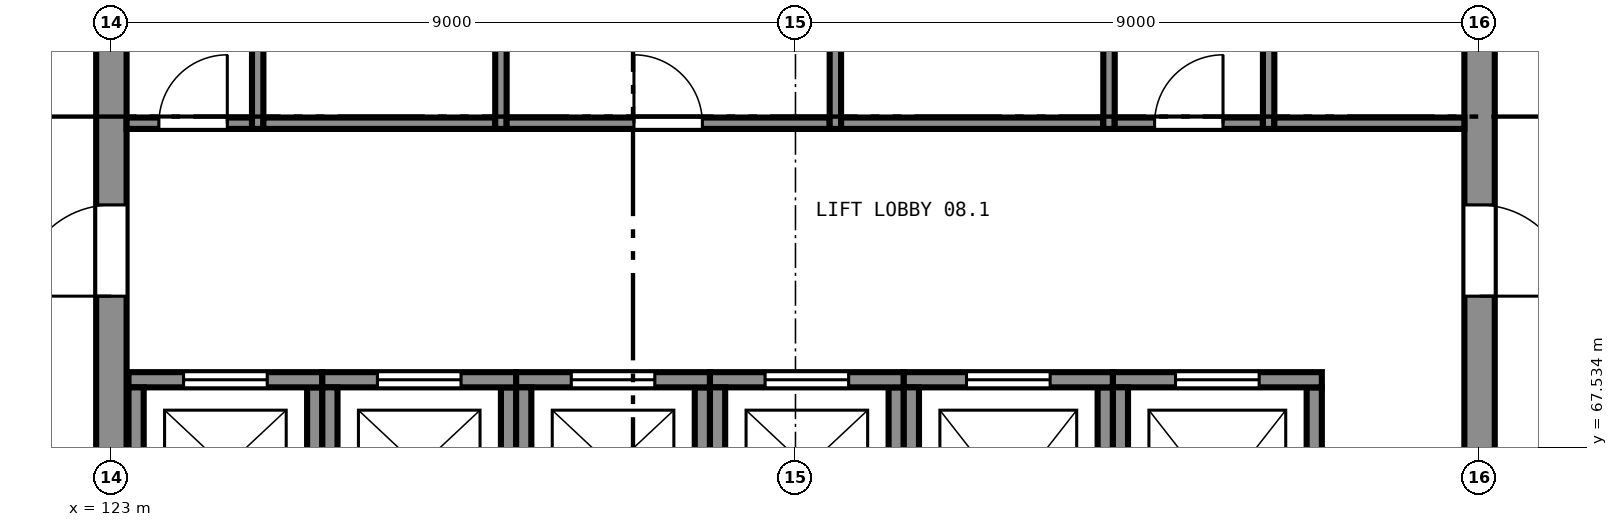
"""IFC4 building model, lengths in metres.
Left out: names, types, materials, properties, quantities, classifications, styles, units other than length and angle.
Written with IfcOpenShell. Run it as: python <this file> out.ifc"""

import sys

from ifc_helpers import new_model, si_unit, direction, frame, frame_2d, origin, place, context, subcontext, project, spatial, rectangle, extrude, element, fill, save


model = new_model("IFC4")
c1 = context("Model", 3, precision=1e-05, world=origin(), true_north=direction((0.0, 1.0)))
c2 = subcontext(c1, "Body", "Model", "MODEL_VIEW")
j1 = project(units=[si_unit("LENGTHUNIT", "METRE"), si_unit("PLANEANGLEUNIT", "RADIAN")], contexts=[c1])
p1 = place(None, origin())
s1 = spatial("IfcSite", under=j1, at=p1, CompositionType="ELEMENT")
p2 = place(p1, origin())
s2 = spatial("IfcBuilding", under=s1, at=p2, CompositionType="ELEMENT")
p3 = place(p2, frame((0.0, 0.0, 33.5)))
s3 = spatial("IfcBuildingStorey", under=s2, at=p3, CompositionType="ELEMENT", Elevation=33.5)
p4 = place(p3, frame((141.0, 65.2, 0.0), z_axis=(0.0, 0.0, 1.0), x_axis=(0.0, 1.0, 0.0)))
e1 = element("IfcWall", 1, at=p4, inside=s3, PredefinedType="SHEAR", context=c2, shape_type="SweptSolid", body=[
    extrude(rectangle(XDim=17.6, YDim=0.4, at=frame_2d((8.8, 0.0))), origin(), (0.0, 0.0, 1.0), 4.0),
])
p5 = place(p4, frame((4.325, 0.0, 0.0)))
e2 = element("IfcOpeningElement", 2, at=p5, cuts=e1, PredefinedType="OPENING", context=c2, shape_type="SweptSolid", body=[
    extrude(rectangle(XDim=1.2, YDim=2.1, at=frame_2d((0.6, 1.05))), frame((0.0, 0.21, 0.0), z_axis=(0.0, -1.0, 0.0), x_axis=(1.0, 0.0, 0.0)), (0.0, 0.0, 1.0), 0.42),
])
p6 = place(p4, frame((12.075, 0.0, 0.0)))
e3 = element("IfcOpeningElement", 3, at=p6, cuts=e1, PredefinedType="OPENING", context=c2, shape_type="SweptSolid", body=[
    extrude(rectangle(XDim=1.2, YDim=2.1, at=frame_2d((0.6, 1.05))), frame((0.0, 0.21, 0.0), z_axis=(0.0, -1.0, 0.0), x_axis=(1.0, 0.0, 0.0)), (0.0, 0.0, 1.0), 0.42),
])
p7 = place(p3, frame((123.0, 82.8, 0.0), z_axis=(0.0, 0.0, 1.0), x_axis=(0.0, -1.0, 0.0)))
e4 = element("IfcWall", 4, at=p7, inside=s3, PredefinedType="SHEAR", context=c2, shape_type="SweptSolid", body=[
    extrude(rectangle(XDim=17.6, YDim=0.4, at=frame_2d((8.8, 0.0))), origin(), (0.0, 0.0, 1.0), 4.0),
])
p8 = place(p7, frame((12.075, 0.0, 0.0)))
e5 = element("IfcOpeningElement", 5, at=p8, cuts=e4, PredefinedType="OPENING", context=c2, shape_type="SweptSolid", body=[
    extrude(rectangle(XDim=1.2, YDim=2.1, at=frame_2d((0.6, 1.05))), frame((0.0, 0.21, 0.0), z_axis=(0.0, -1.0, 0.0), x_axis=(1.0, 0.0, 0.0)), (0.0, 0.0, 1.0), 0.42),
])
p9 = place(p7, frame((4.325, 0.0, 0.0)))
e6 = element("IfcOpeningElement", 6, at=p9, cuts=e4, PredefinedType="OPENING", context=c2, shape_type="SweptSolid", body=[
    extrude(rectangle(XDim=1.2, YDim=2.1, at=frame_2d((0.6, 1.05))), frame((0.0, 0.21, 0.0), z_axis=(0.0, -1.0, 0.0), x_axis=(1.0, 0.0, 0.0)), (0.0, 0.0, 1.0), 0.42),
])
p10 = place(p3, frame((125.675, 66.225, 0.0), z_axis=(0.0, 0.0, 1.0), x_axis=(0.0, 1.0, 0.0)))
e7 = element("IfcWall", 7, at=p10, inside=s3, PredefinedType="SHEAR", context=c2, shape_type="SweptSolid", body=[
    extrude(rectangle(XDim=2.1, YDim=0.2, at=frame_2d((1.05, 0.0))), origin(), (0.0, 0.0, 1.0), 4.0),
])
p11 = place(p3, frame((125.775, 68.425, 0.0), z_axis=(0.0, 0.0, 1.0), x_axis=(-1.0, 0.0, 0.0)))
e8 = element("IfcWall", 8, at=p11, inside=s3, PredefinedType="SHEAR", context=c2, shape_type="SweptSolid", body=[
    extrude(rectangle(XDim=2.55, YDim=0.2, at=frame_2d((1.275, 0.0))), origin(), (0.0, 0.0, 1.0), 4.0),
])
p12 = place(p11, frame((0.725, 0.0, 0.0)))
e9 = element("IfcOpeningElement", 9, at=p12, cuts=e8, PredefinedType="OPENING", context=c2, shape_type="SweptSolid", body=[
    extrude(rectangle(XDim=1.1, YDim=2.1, at=frame_2d((0.55, 1.05))), frame((0.0, 0.11, 0.0), z_axis=(0.0, -1.0, 0.0), x_axis=(1.0, 0.0, 0.0)), (0.0, 0.0, 1.0), 0.22),
])
for number, where, z_axis, x_axis in (
    (10, (123.325, 68.325, 0.0), (0.0, 0.0, 1.0), (0.0, -1.0, 0.0)),
    (11, (128.225, 66.225, 0.0), (0.0, 0.0, 1.0), (0.0, 1.0, 0.0)),
):
    element("IfcWall", number, at=place(p3, frame(where, z_axis=z_axis, x_axis=x_axis)), inside=s3, PredefinedType="SHEAR", context=c2, shape_type="SweptSolid", body=[
        extrude(rectangle(XDim=2.1, YDim=0.2, at=frame_2d((1.05, 0.0))), origin(), (0.0, 0.0, 1.0), 4.0),
    ])
p13 = place(p3, frame((128.325, 68.425, 0.0), z_axis=(0.0, 0.0, 1.0), x_axis=(-1.0, 0.0, 0.0)))
e12 = element("IfcWall", 12, at=p13, inside=s3, PredefinedType="SHEAR", context=c2, shape_type="SweptSolid", body=[
    extrude(rectangle(XDim=2.55, YDim=0.2, at=frame_2d((1.275, 0.0))), origin(), (0.0, 0.0, 1.0), 4.0),
])
p14 = place(p13, frame((0.725, 0.0, 0.0)))
e13 = element("IfcOpeningElement", 13, at=p14, cuts=e12, PredefinedType="OPENING", context=c2, shape_type="SweptSolid", body=[
    extrude(rectangle(XDim=1.1, YDim=2.1, at=frame_2d((0.55, 1.05))), frame((0.0, 0.11, 0.0), z_axis=(0.0, -1.0, 0.0), x_axis=(1.0, 0.0, 0.0)), (0.0, 0.0, 1.0), 0.22),
])
for number, where, z_axis, x_axis in (
    (14, (125.875, 68.325, 0.0), (0.0, 0.0, 1.0), (0.0, -1.0, 0.0)),
    (15, (130.775, 66.225, 0.0), (0.0, 0.0, 1.0), (0.0, 1.0, 0.0)),
):
    element("IfcWall", number, at=place(p3, frame(where, z_axis=z_axis, x_axis=x_axis)), inside=s3, PredefinedType="SHEAR", context=c2, shape_type="SweptSolid", body=[
        extrude(rectangle(XDim=2.1, YDim=0.2, at=frame_2d((1.05, 0.0))), origin(), (0.0, 0.0, 1.0), 4.0),
    ])
p15 = place(p3, frame((130.875, 68.425, 0.0), z_axis=(0.0, 0.0, 1.0), x_axis=(-1.0, 0.0, 0.0)))
e16 = element("IfcWall", 16, at=p15, inside=s3, PredefinedType="SHEAR", context=c2, shape_type="SweptSolid", body=[
    extrude(rectangle(XDim=2.55, YDim=0.2, at=frame_2d((1.275, 0.0))), origin(), (0.0, 0.0, 1.0), 4.0),
])
p16 = place(p15, frame((0.725, 0.0, 0.0)))
e17 = element("IfcOpeningElement", 17, at=p16, cuts=e16, PredefinedType="OPENING", context=c2, shape_type="SweptSolid", body=[
    extrude(rectangle(XDim=1.1, YDim=2.1, at=frame_2d((0.55, 1.05))), frame((0.0, 0.11, 0.0), z_axis=(0.0, -1.0, 0.0), x_axis=(1.0, 0.0, 0.0)), (0.0, 0.0, 1.0), 0.22),
])
for number, where, z_axis, x_axis in (
    (18, (128.425, 68.325, 0.0), (0.0, 0.0, 1.0), (0.0, -1.0, 0.0)),
    (19, (133.325, 66.225, 0.0), (0.0, 0.0, 1.0), (0.0, 1.0, 0.0)),
):
    element("IfcWall", number, at=place(p3, frame(where, z_axis=z_axis, x_axis=x_axis)), inside=s3, PredefinedType="SHEAR", context=c2, shape_type="SweptSolid", body=[
        extrude(rectangle(XDim=2.1, YDim=0.2, at=frame_2d((1.05, 0.0))), origin(), (0.0, 0.0, 1.0), 4.0),
    ])
p17 = place(p3, frame((133.425, 68.425, 0.0), z_axis=(0.0, 0.0, 1.0), x_axis=(-1.0, 0.0, 0.0)))
e20 = element("IfcWall", 20, at=p17, inside=s3, PredefinedType="SHEAR", context=c2, shape_type="SweptSolid", body=[
    extrude(rectangle(XDim=2.55, YDim=0.2, at=frame_2d((1.275, 0.0))), origin(), (0.0, 0.0, 1.0), 4.0),
])
p18 = place(p17, frame((0.725, 0.0, 0.0)))
e21 = element("IfcOpeningElement", 21, at=p18, cuts=e20, PredefinedType="OPENING", context=c2, shape_type="SweptSolid", body=[
    extrude(rectangle(XDim=1.1, YDim=2.1, at=frame_2d((0.55, 1.05))), frame((0.0, 0.11, 0.0), z_axis=(0.0, -1.0, 0.0), x_axis=(1.0, 0.0, 0.0)), (0.0, 0.0, 1.0), 0.22),
])
p19 = place(p3, frame((130.975, 68.325, 0.0), z_axis=(0.0, 0.0, 1.0), x_axis=(0.0, -1.0, 0.0)))
e22 = element("IfcWall", 22, at=p19, inside=s3, PredefinedType="SHEAR", context=c2, shape_type="SweptSolid", body=[
    extrude(rectangle(XDim=2.1, YDim=0.2, at=frame_2d((1.05, 0.0))), origin(), (0.0, 0.0, 1.0), 4.0),
])
p20 = place(p3, frame((136.075, 65.425, 0.0), z_axis=(0.0, 0.0, 1.0), x_axis=(0.0, 1.0, 0.0)))
e23 = element("IfcWall", 23, at=p20, inside=s3, PredefinedType="SHEAR", context=c2, shape_type="SweptSolid", body=[
    extrude(rectangle(XDim=2.9, YDim=0.2, at=frame_2d((1.45, 0.0))), origin(), (0.0, 0.0, 1.0), 4.0),
])
p21 = place(p3, frame((136.175, 68.425, 0.0), z_axis=(0.0, 0.0, 1.0), x_axis=(-1.0, 0.0, 0.0)))
e24 = element("IfcWall", 24, at=p21, inside=s3, PredefinedType="SHEAR", context=c2, shape_type="SweptSolid", body=[
    extrude(rectangle(XDim=2.75, YDim=0.2, at=frame_2d((1.375, 0.0))), origin(), (0.0, 0.0, 1.0), 4.0),
])
p22 = place(p21, frame((0.825, 0.0, 0.0)))
e25 = element("IfcOpeningElement", 25, at=p22, cuts=e24, PredefinedType="OPENING", context=c2, shape_type="SweptSolid", body=[
    extrude(rectangle(XDim=1.1, YDim=2.1, at=frame_2d((0.55, 1.05))), frame((0.0, 0.11, 0.0), z_axis=(0.0, -1.0, 0.0), x_axis=(1.0, 0.0, 0.0)), (0.0, 0.0, 1.0), 0.22),
])
for number, where, z_axis, x_axis in (
    (26, (133.525, 68.325, 0.0), (0.0, 0.0, 1.0), (0.0, -1.0, 0.0)),
    (27, (138.825, 65.425, 0.0), (0.0, 0.0, 1.0), (0.0, 1.0, 0.0)),
):
    element("IfcWall", number, at=place(p3, frame(where, z_axis=z_axis, x_axis=x_axis)), inside=s3, PredefinedType="SHEAR", context=c2, shape_type="SweptSolid", body=[
        extrude(rectangle(XDim=2.9, YDim=0.2, at=frame_2d((1.45, 0.0))), origin(), (0.0, 0.0, 1.0), 4.0),
    ])
p23 = place(p3, frame((138.925, 68.425, 0.0), z_axis=(0.0, 0.0, 1.0), x_axis=(-1.0, 0.0, 0.0)))
e28 = element("IfcWall", 28, at=p23, inside=s3, PredefinedType="SHEAR", context=c2, shape_type="SweptSolid", body=[
    extrude(rectangle(XDim=2.75, YDim=0.2, at=frame_2d((1.375, 0.0))), origin(), (0.0, 0.0, 1.0), 4.0),
])
p24 = place(p23, frame((0.825, 0.0, 0.0)))
e29 = element("IfcOpeningElement", 29, at=p24, cuts=e28, PredefinedType="OPENING", context=c2, shape_type="SweptSolid", body=[
    extrude(rectangle(XDim=1.1, YDim=2.1, at=frame_2d((0.55, 1.05))), frame((0.0, 0.11, 0.0), z_axis=(0.0, -1.0, 0.0), x_axis=(1.0, 0.0, 0.0)), (0.0, 0.0, 1.0), 0.22),
])
p25 = place(p3, frame((136.275, 68.325, 0.0), z_axis=(0.0, 0.0, 1.0), x_axis=(0.0, -1.0, 0.0)))
e30 = element("IfcWall", 30, at=p25, inside=s3, PredefinedType="SHEAR", context=c2, shape_type="SweptSolid", body=[
    extrude(rectangle(XDim=2.9, YDim=0.2, at=frame_2d((1.45, 0.0))), origin(), (0.0, 0.0, 1.0), 4.0),
])
p26 = place(p3, frame((124.925, 71.725, 0.0), z_axis=(0.0, 0.0, 1.0), x_axis=(0.0, 1.0, 0.0)))
e31 = element("IfcWall", 31, at=p26, inside=s3, PredefinedType="PARTITIONING", context=c2, shape_type="SweptSolid", body=[
    extrude(rectangle(XDim=4.55, YDim=0.15, at=frame_2d((2.275, 0.0))), origin(), (0.0, 0.0, 1.0), 3.75),
])
p27 = place(p3, frame((123.2, 71.8, 0.0), z_axis=(0.0, 0.0, 1.0), x_axis=(1.0, 0.0, 0.0)))
e32 = element("IfcWall", 32, at=p27, inside=s3, PredefinedType="PARTITIONING", context=c2, shape_type="SweptSolid", body=[
    extrude(rectangle(XDim=1.65, YDim=0.15, at=frame_2d((0.825, 0.0))), origin(), (0.0, 0.0, 1.0), 3.75),
])
p28 = place(p27, frame((0.425, 0.0, 0.0)))
e33 = element("IfcOpeningElement", 33, at=p28, cuts=e32, PredefinedType="OPENING", context=c2, shape_type="SweptSolid", body=[
    extrude(rectangle(XDim=0.9, YDim=2.1, at=frame_2d((0.45, 1.05))), frame((0.0, 0.085, 0.0), z_axis=(0.0, -1.0, 0.0), x_axis=(1.0, 0.0, 0.0)), (0.0, 0.0, 1.0), 0.17),
])
p29 = place(p3, frame((128.125, 71.725, 0.0), z_axis=(0.0, 0.0, 1.0), x_axis=(0.0, 1.0, 0.0)))
e34 = element("IfcWall", 34, at=p29, inside=s3, PredefinedType="PARTITIONING", context=c2, shape_type="SweptSolid", body=[
    extrude(rectangle(XDim=4.55, YDim=0.15, at=frame_2d((2.275, 0.0))), origin(), (0.0, 0.0, 1.0), 3.75),
])
p30 = place(p3, frame((125.0, 71.8, 0.0), z_axis=(0.0, 0.0, 1.0), x_axis=(1.0, 0.0, 0.0)))
e35 = element("IfcWall", 35, at=p30, inside=s3, PredefinedType="PARTITIONING", context=c2, shape_type="SweptSolid", body=[
    extrude(rectangle(XDim=3.05, YDim=0.15, at=frame_2d((1.525, 0.0))), origin(), (0.0, 0.0, 1.0), 3.75),
])
p31 = place(p3, frame((132.525, 71.725, 0.0), z_axis=(0.0, 0.0, 1.0), x_axis=(0.0, 1.0, 0.0)))
e36 = element("IfcWall", 36, at=p31, inside=s3, PredefinedType="PARTITIONING", context=c2, shape_type="SweptSolid", body=[
    extrude(rectangle(XDim=4.55, YDim=0.15, at=frame_2d((2.275, 0.0))), origin(), (0.0, 0.0, 1.0), 3.75),
])
p32 = place(p3, frame((128.2, 71.8, 0.0), z_axis=(0.0, 0.0, 1.0), x_axis=(1.0, 0.0, 0.0)))
e37 = element("IfcWall", 37, at=p32, inside=s3, PredefinedType="PARTITIONING", context=c2, shape_type="SweptSolid", body=[
    extrude(rectangle(XDim=4.25, YDim=0.15, at=frame_2d((2.125, 0.0))), origin(), (0.0, 0.0, 1.0), 3.75),
])
p33 = place(p32, frame((1.675, 0.0, 0.0)))
e38 = element("IfcOpeningElement", 38, at=p33, cuts=e37, PredefinedType="OPENING", context=c2, shape_type="SweptSolid", body=[
    extrude(rectangle(XDim=0.9, YDim=2.1, at=frame_2d((0.45, 1.05))), frame((0.0, 0.085, 0.0), z_axis=(0.0, -1.0, 0.0), x_axis=(1.0, 0.0, 0.0)), (0.0, 0.0, 1.0), 0.17),
])
p34 = place(p3, frame((136.125, 71.725, 0.0), z_axis=(0.0, 0.0, 1.0), x_axis=(0.0, 1.0, 0.0)))
e39 = element("IfcWall", 39, at=p34, inside=s3, PredefinedType="PARTITIONING", context=c2, shape_type="SweptSolid", body=[
    extrude(rectangle(XDim=4.55, YDim=0.15, at=frame_2d((2.275, 0.0))), origin(), (0.0, 0.0, 1.0), 3.75),
])
p35 = place(p3, frame((132.6, 71.8, 0.0), z_axis=(0.0, 0.0, 1.0), x_axis=(1.0, 0.0, 0.0)))
e40 = element("IfcWall", 40, at=p35, inside=s3, PredefinedType="PARTITIONING", context=c2, shape_type="SweptSolid", body=[
    extrude(rectangle(XDim=3.45, YDim=0.15, at=frame_2d((1.725, 0.0))), origin(), (0.0, 0.0, 1.0), 3.75),
])
p36 = place(p3, frame((138.225, 71.725, 0.0), z_axis=(0.0, 0.0, 1.0), x_axis=(0.0, 1.0, 0.0)))
e41 = element("IfcWall", 41, at=p36, inside=s3, PredefinedType="PARTITIONING", context=c2, shape_type="SweptSolid", body=[
    extrude(rectangle(XDim=4.55, YDim=0.15, at=frame_2d((2.275, 0.0))), origin(), (0.0, 0.0, 1.0), 3.75),
])
p37 = place(p3, frame((136.2, 71.8, 0.0), z_axis=(0.0, 0.0, 1.0), x_axis=(1.0, 0.0, 0.0)))
e42 = element("IfcWall", 42, at=p37, inside=s3, PredefinedType="PARTITIONING", context=c2, shape_type="SweptSolid", body=[
    extrude(rectangle(XDim=1.95, YDim=0.15, at=frame_2d((0.975, 0.0))), origin(), (0.0, 0.0, 1.0), 3.75),
])
p38 = place(p37, frame((0.525, 0.0, 0.0)))
e43 = element("IfcOpeningElement", 43, at=p38, cuts=e42, PredefinedType="OPENING", context=c2, shape_type="SweptSolid", body=[
    extrude(rectangle(XDim=0.9, YDim=2.1, at=frame_2d((0.45, 1.05))), frame((0.0, 0.085, 0.0), z_axis=(0.0, -1.0, 0.0), x_axis=(1.0, 0.0, 0.0)), (0.0, 0.0, 1.0), 0.17),
])
p39 = place(p3, frame((138.3, 71.8, 0.0), z_axis=(0.0, 0.0, 1.0), x_axis=(1.0, 0.0, 0.0)))
e44 = element("IfcWall", 44, at=p39, inside=s3, PredefinedType="PARTITIONING", context=c2, shape_type="SweptSolid", body=[
    extrude(rectangle(XDim=2.5, YDim=0.15, at=frame_2d((1.25, 0.0))), origin(), (0.0, 0.0, 1.0), 3.75),
])
p40 = place(p12, origin())
e45 = element("IfcDoor", 45, at=p40, inside=s3, OperationType="SLIDING_TO_LEFT", PredefinedType="DOOR", context=c2, shape_type="SweptSolid", body=[
    extrude(rectangle(XDim=1.1, YDim=2.1, at=frame_2d((0.55, 1.05))), frame((0.0, 0.025, 0.0), z_axis=(0.0, -1.0, 0.0), x_axis=(1.0, 0.0, 0.0)), (0.0, 0.0, 1.0), 0.05),
])
fill(e9, e45)
p41 = place(p14, origin())
e46 = element("IfcDoor", 46, at=p41, inside=s3, OperationType="SLIDING_TO_LEFT", PredefinedType="DOOR", context=c2, shape_type="SweptSolid", body=[
    extrude(rectangle(XDim=1.1, YDim=2.1, at=frame_2d((0.55, 1.05))), frame((0.0, 0.025, 0.0), z_axis=(0.0, -1.0, 0.0), x_axis=(1.0, 0.0, 0.0)), (0.0, 0.0, 1.0), 0.05),
])
fill(e13, e46)
p42 = place(p16, origin())
e47 = element("IfcDoor", 47, at=p42, inside=s3, OperationType="SLIDING_TO_LEFT", PredefinedType="DOOR", context=c2, shape_type="SweptSolid", body=[
    extrude(rectangle(XDim=1.1, YDim=2.1, at=frame_2d((0.55, 1.05))), frame((0.0, 0.025, 0.0), z_axis=(0.0, -1.0, 0.0), x_axis=(1.0, 0.0, 0.0)), (0.0, 0.0, 1.0), 0.05),
])
fill(e17, e47)
p43 = place(p18, origin())
e48 = element("IfcDoor", 48, at=p43, inside=s3, OperationType="SLIDING_TO_LEFT", PredefinedType="DOOR", context=c2, shape_type="SweptSolid", body=[
    extrude(rectangle(XDim=1.1, YDim=2.1, at=frame_2d((0.55, 1.05))), frame((0.0, 0.025, 0.0), z_axis=(0.0, -1.0, 0.0), x_axis=(1.0, 0.0, 0.0)), (0.0, 0.0, 1.0), 0.05),
])
fill(e21, e48)
p44 = place(p22, origin())
e49 = element("IfcDoor", 49, at=p44, inside=s3, OperationType="SLIDING_TO_LEFT", PredefinedType="DOOR", context=c2, shape_type="SweptSolid", body=[
    extrude(rectangle(XDim=1.1, YDim=2.1, at=frame_2d((0.55, 1.05))), frame((0.0, 0.025, 0.0), z_axis=(0.0, -1.0, 0.0), x_axis=(1.0, 0.0, 0.0)), (0.0, 0.0, 1.0), 0.05),
])
fill(e25, e49)
p45 = place(p24, origin())
e50 = element("IfcDoor", 50, at=p45, inside=s3, OperationType="SLIDING_TO_LEFT", PredefinedType="DOOR", context=c2, shape_type="SweptSolid", body=[
    extrude(rectangle(XDim=1.1, YDim=2.1, at=frame_2d((0.55, 1.05))), frame((0.0, 0.025, 0.0), z_axis=(0.0, -1.0, 0.0), x_axis=(1.0, 0.0, 0.0)), (0.0, 0.0, 1.0), 0.05),
])
fill(e29, e50)
p46 = place(p8, frame((1.2, 0.0, 0.0), z_axis=(0.0, 0.0, 1.0), x_axis=(-1.0, 0.0, 0.0)))
e51 = element("IfcDoor", 51, at=p46, inside=s3, OperationType="SINGLE_SWING_RIGHT", PredefinedType="DOOR", context=c2, shape_type="SweptSolid", body=[
    extrude(rectangle(XDim=1.2, YDim=2.1, at=frame_2d((0.6, 1.05))), frame((0.0, 0.025, 0.0), z_axis=(0.0, -1.0, 0.0), x_axis=(1.0, 0.0, 0.0)), (0.0, 0.0, 1.0), 0.05),
])
fill(e5, e51)
p47 = place(p5, frame((1.2, 0.0, 0.0), z_axis=(0.0, 0.0, 1.0), x_axis=(-1.0, 0.0, 0.0)))
e52 = element("IfcDoor", 52, at=p47, inside=s3, OperationType="SINGLE_SWING_LEFT", PredefinedType="DOOR", context=c2, shape_type="SweptSolid", body=[
    extrude(rectangle(XDim=1.2, YDim=2.1, at=frame_2d((0.6, 1.05))), frame((0.0, 0.025, 0.0), z_axis=(0.0, -1.0, 0.0), x_axis=(1.0, 0.0, 0.0)), (0.0, 0.0, 1.0), 0.05),
])
fill(e2, e52)
p48 = place(p28, origin())
e53 = element("IfcDoor", 53, at=p48, inside=s3, OperationType="SINGLE_SWING_LEFT", PredefinedType="DOOR", context=c2, shape_type="SweptSolid", body=[
    extrude(rectangle(XDim=0.9, YDim=2.1, at=frame_2d((0.45, 1.05))), frame((0.0, 0.025, 0.0), z_axis=(0.0, -1.0, 0.0), x_axis=(1.0, 0.0, 0.0)), (0.0, 0.0, 1.0), 0.05),
])
fill(e33, e53)
p49 = place(p33, origin())
e54 = element("IfcDoor", 54, at=p49, inside=s3, OperationType="SINGLE_SWING_RIGHT", PredefinedType="DOOR", context=c2, shape_type="SweptSolid", body=[
    extrude(rectangle(XDim=0.9, YDim=2.1, at=frame_2d((0.45, 1.05))), frame((0.0, 0.025, 0.0), z_axis=(0.0, -1.0, 0.0), x_axis=(1.0, 0.0, 0.0)), (0.0, 0.0, 1.0), 0.05),
])
fill(e38, e54)
p50 = place(p38, origin())
e55 = element("IfcDoor", 55, at=p50, inside=s3, OperationType="SINGLE_SWING_LEFT", PredefinedType="DOOR", context=c2, shape_type="SweptSolid", body=[
    extrude(rectangle(XDim=0.9, YDim=2.1, at=frame_2d((0.45, 1.05))), frame((0.0, 0.025, 0.0), z_axis=(0.0, -1.0, 0.0), x_axis=(1.0, 0.0, 0.0)), (0.0, 0.0, 1.0), 0.05),
])
fill(e43, e55)
save(model, sys.argv[1])
